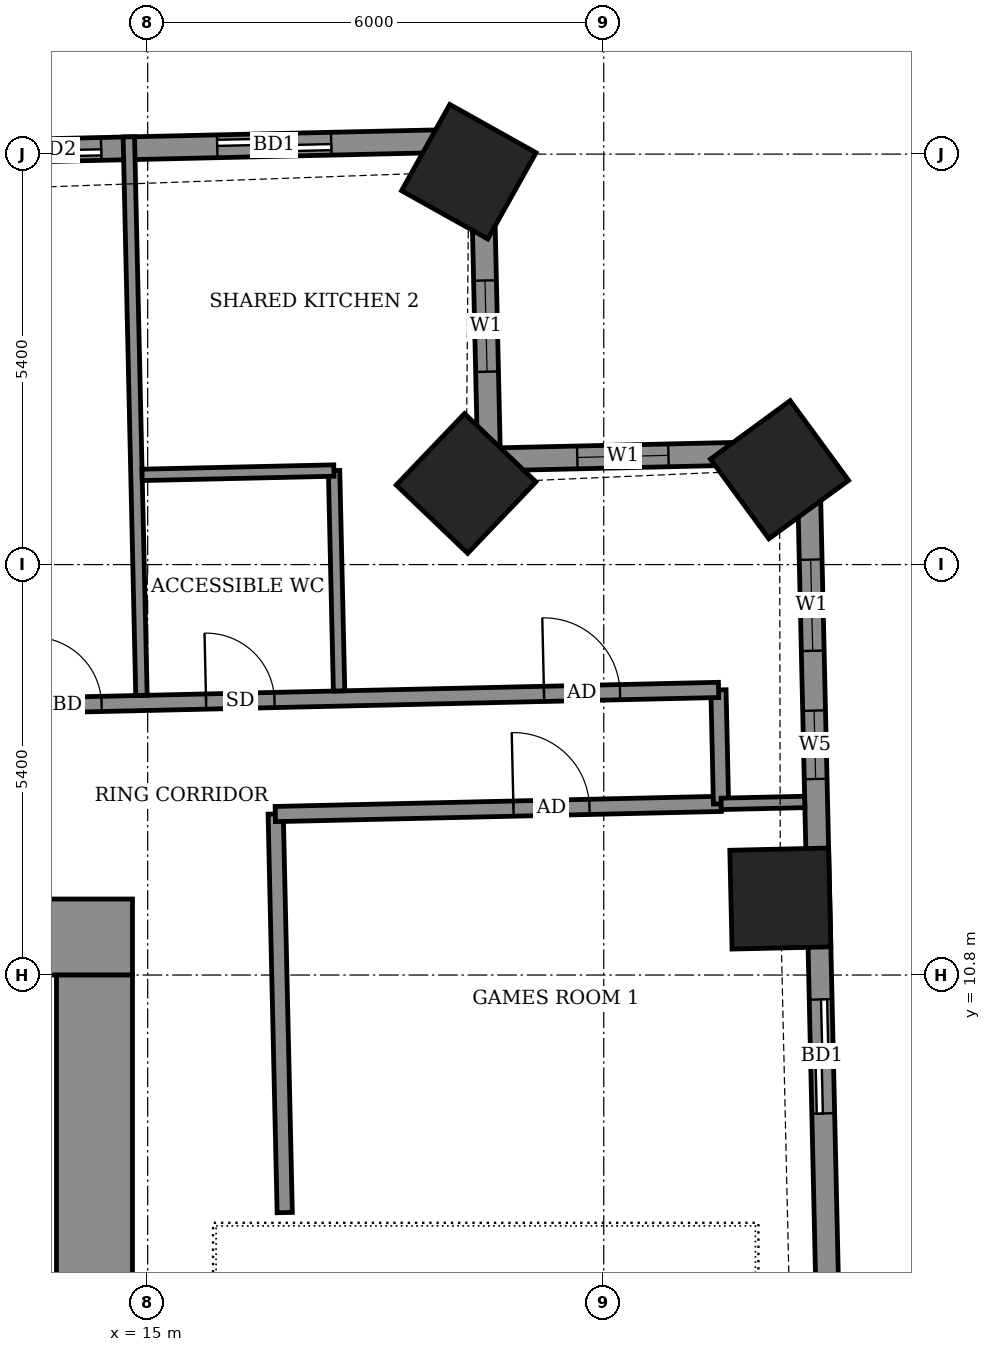
"""IFC4 building model, lengths in metres.
Left out: names, types, materials, properties, quantities, classifications, styles, units other than length and angle.
Written with IfcOpenShell. Run it as: python <this file> out.ifc"""

import sys

from ifc_helpers import new_model, si_unit, direction, frame, frame_2d, origin, origin_2d, place, context, subcontext, project, spatial, rectangle, extrude, element, fill, save


model = new_model("IFC4")
c1 = context("Model", 3, precision=1e-05, world=origin(), true_north=direction((0.0, 1.0)))
c2 = subcontext(c1, "Body", "Model", "MODEL_VIEW")
j1 = project(units=[si_unit("LENGTHUNIT", "METRE"), si_unit("PLANEANGLEUNIT", "RADIAN")], contexts=[c1])
p1 = place(None, origin())
s1 = spatial("IfcSite", under=j1, at=p1, CompositionType="ELEMENT")
p2 = place(p1, origin())
s2 = spatial("IfcBuilding", under=s1, at=p2, CompositionType="ELEMENT")
p3 = place(p2, frame((0.0, 0.0, 137.3)))
s3 = spatial("IfcBuildingStorey", under=s2, at=p3, CompositionType="ELEMENT", Elevation=137.3)
for number, where, z_axis, x_axis in (
    (1, (23.323, 11.806, -0.55), (0.0, 0.0, 1.0), (-0.023, 1.0, 0.0)),
    (2, (23.313, 17.448, -0.55), (0.0, 0.0, 1.0), (-0.591, 0.807, 0.0)),
    (3, (19.189, 17.267, -0.55), (0.0, 0.0, 1.0), (-0.723, 0.691, 0.0)),
    (4, (19.225, 21.369, -0.55), (0.0, 0.0, 1.0), (-0.873, 0.488, 0.0)),
):
    element("IfcColumn", number, at=place(p3, frame(where, z_axis=z_axis, x_axis=x_axis)), inside=s3, PredefinedType="COLUMN", context=c2, shape_type="SweptSolid", body=[
        extrude(rectangle(XDim=1.3, YDim=1.3, at=origin_2d()), origin(), (0.0, 0.0, 1.0), 3.6),
    ])
p4 = place(p3, frame((23.961, 5.752, 0.0), z_axis=(0.0, 0.0, 1.0), x_axis=(-0.022715362207, 0.999741972871, 0.0)))
e5 = element("IfcWall", 5, at=p4, inside=s3, PredefinedType="SOLIDWALL", context=c2, shape_type="SweptSolid", body=[
    extrude(rectangle(XDim=11.93, YDim=0.3, at=frame_2d((5.965, 0.0))), origin(), (0.0, 0.0, 1.0), 3.05),
])
p5 = place(p4, frame((3.228, 0.0, 0.0)))
e6 = element("IfcOpeningElement", 6, at=p5, cuts=e5, PredefinedType="OPENING", context=c2, shape_type="SweptSolid", body=[
    extrude(rectangle(XDim=1.5, YDim=2.4, at=frame_2d((0.75, 1.2))), frame((0.0, 0.16, 0.0), z_axis=(0.0, -1.0, 0.0), x_axis=(1.0, 0.0, 0.0)), (0.0, 0.0, 1.0), 0.32),
])
p6 = place(p4, frame((7.629, 0.0, 0.9)))
e7 = element("IfcOpeningElement", 7, at=p6, cuts=e5, PredefinedType="OPENING", context=c2, shape_type="SweptSolid", body=[
    extrude(rectangle(XDim=0.9, YDim=1.5, at=frame_2d((0.45, 0.75))), frame((0.0, 0.16, 0.0), z_axis=(0.0, -1.0, 0.0), x_axis=(1.0, 0.0, 0.0)), (0.0, 0.0, 1.0), 0.32),
])
p7 = place(p4, frame((9.316, 0.0, 0.9)))
e8 = element("IfcOpeningElement", 8, at=p7, cuts=e5, PredefinedType="OPENING", context=c2, shape_type="SweptSolid", body=[
    extrude(rectangle(XDim=1.2, YDim=1.5, at=frame_2d((0.6, 0.75))), frame((0.0, 0.16, 0.0), z_axis=(0.0, -1.0, 0.0), x_axis=(1.0, 0.0, 0.0)), (0.0, 0.0, 1.0), 0.32),
])
p8 = place(p3, frame((23.69, 17.679, 0.0), z_axis=(0.0, 0.0, 1.0), x_axis=(-0.999739037152, -0.022844202663, 0.0)))
e9 = element("IfcWall", 9, at=p8, inside=s3, PredefinedType="SOLIDWALL", context=c2, shape_type="SweptSolid", body=[
    extrude(rectangle(XDim=4.2, YDim=0.3, at=frame_2d((2.1, 0.0))), origin(), (0.0, 0.0, 1.0), 2.55),
])
p9 = place(p8, frame((1.839, 0.0, 0.9)))
e10 = element("IfcOpeningElement", 10, at=p9, cuts=e9, PredefinedType="OPENING", context=c2, shape_type="SweptSolid", body=[
    extrude(rectangle(XDim=1.2, YDim=1.5, at=frame_2d((0.6, 0.75))), frame((0.0, 0.16, 0.0), z_axis=(0.0, -1.0, 0.0), x_axis=(1.0, 0.0, 0.0)), (0.0, 0.0, 1.0), 0.32),
])
p10 = place(p3, frame((19.491, 17.583, 0.0), z_axis=(0.0, 0.0, 1.0), x_axis=(-0.022611811187, 0.999744320311, 0.0)))
e11 = element("IfcWall", 11, at=p10, inside=s3, PredefinedType="SOLIDWALL", context=c2, shape_type="SweptSolid", body=[
    extrude(rectangle(XDim=4.2, YDim=0.3, at=frame_2d((2.1, 0.0))), origin(), (0.0, 0.0, 1.0), 2.55),
])
p11 = place(p10, frame((1.155, 0.0, 0.9)))
e12 = element("IfcOpeningElement", 12, at=p11, cuts=e11, PredefinedType="OPENING", context=c2, shape_type="SweptSolid", body=[
    extrude(rectangle(XDim=1.2, YDim=1.5, at=frame_2d((0.6, 0.75))), frame((0.0, 0.16, 0.0), z_axis=(0.0, -1.0, 0.0), x_axis=(1.0, 0.0, 0.0)), (0.0, 0.0, 1.0), 0.32),
])
p12 = place(p3, frame((19.396, 21.782, 0.0), z_axis=(0.0, 0.0, 1.0), x_axis=(-0.999742636707, -0.022686126826, 0.0)))
e13 = element("IfcWall", 13, at=p12, inside=s3, PredefinedType="SOLIDWALL", context=c2, shape_type="SweptSolid", body=[
    extrude(rectangle(XDim=42.444, YDim=0.3, at=frame_2d((21.222, 0.0))), origin(), (0.0, 0.0, 1.0), 3.05),
])
p13 = place(p12, frame((1.982, 0.0, 0.0)))
e14 = element("IfcOpeningElement", 14, at=p13, cuts=e13, PredefinedType="OPENING", context=c2, shape_type="SweptSolid", body=[
    extrude(rectangle(XDim=1.5, YDim=2.4, at=frame_2d((0.75, 1.2))), frame((0.0, 0.16, 0.0), z_axis=(0.0, -1.0, 0.0), x_axis=(1.0, 0.0, 0.0)), (0.0, 0.0, 1.0), 0.32),
])
p14 = place(p12, frame((5.009, 0.0, 0.0)))
e15 = element("IfcOpeningElement", 15, at=p14, cuts=e13, PredefinedType="OPENING", context=c2, shape_type="SweptSolid", body=[
    extrude(rectangle(XDim=1.2, YDim=2.4, at=frame_2d((0.6, 1.2))), frame((0.0, 0.16, 0.0), z_axis=(0.0, -1.0, 0.0), x_axis=(1.0, 0.0, 0.0)), (0.0, 0.0, 1.0), 0.32),
])
p15 = place(p12, frame((10.394, 0.0, 0.0)))
e16 = element("IfcOpeningElement", 16, at=p15, cuts=e13, PredefinedType="OPENING", context=c2, shape_type="SweptSolid", body=[
    extrude(rectangle(XDim=1.5, YDim=2.4, at=frame_2d((0.75, 1.2))), frame((0.0, 0.16, 0.0), z_axis=(0.0, -1.0, 0.0), x_axis=(1.0, 0.0, 0.0)), (0.0, 0.0, 1.0), 0.32),
])
p16 = place(p12, frame((15.346, 0.0, 0.0)))
e17 = element("IfcOpeningElement", 17, at=p16, cuts=e13, PredefinedType="OPENING", context=c2, shape_type="SweptSolid", body=[
    extrude(rectangle(XDim=1.5, YDim=2.4, at=frame_2d((0.75, 1.2))), frame((0.0, 0.16, 0.0), z_axis=(0.0, -1.0, 0.0), x_axis=(1.0, 0.0, 0.0)), (0.0, 0.0, 1.0), 0.32),
])
p17 = place(p12, frame((18.508, 0.0, 0.0)))
e18 = element("IfcOpeningElement", 18, at=p17, cuts=e13, PredefinedType="OPENING", context=c2, shape_type="SweptSolid", body=[
    extrude(rectangle(XDim=1.5, YDim=2.4, at=frame_2d((0.75, 1.2))), frame((0.0, 0.16, 0.0), z_axis=(0.0, -1.0, 0.0), x_axis=(1.0, 0.0, 0.0)), (0.0, 0.0, 1.0), 0.32),
])
p18 = place(p12, frame((23.544, 0.0, 0.0)))
e19 = element("IfcOpeningElement", 19, at=p18, cuts=e13, PredefinedType="OPENING", context=c2, shape_type="SweptSolid", body=[
    extrude(rectangle(XDim=1.5, YDim=2.4, at=frame_2d((0.75, 1.2))), frame((0.0, 0.16, 0.0), z_axis=(0.0, -1.0, 0.0), x_axis=(1.0, 0.0, 0.0)), (0.0, 0.0, 1.0), 0.32),
])
p19 = place(p12, frame((29.195, 0.0, 0.0)))
e20 = element("IfcOpeningElement", 20, at=p19, cuts=e13, PredefinedType="OPENING", context=c2, shape_type="SweptSolid", body=[
    extrude(rectangle(XDim=1.5, YDim=2.4, at=frame_2d((0.75, 1.2))), frame((0.0, 0.16, 0.0), z_axis=(0.0, -1.0, 0.0), x_axis=(1.0, 0.0, 0.0)), (0.0, 0.0, 1.0), 0.32),
])
p20 = place(p12, frame((32.357, 0.0, 0.0)))
e21 = element("IfcOpeningElement", 21, at=p20, cuts=e13, PredefinedType="OPENING", context=c2, shape_type="SweptSolid", body=[
    extrude(rectangle(XDim=1.5, YDim=2.4, at=frame_2d((0.75, 1.2))), frame((0.0, 0.16, 0.0), z_axis=(0.0, -1.0, 0.0), x_axis=(1.0, 0.0, 0.0)), (0.0, 0.0, 1.0), 0.32),
])
p21 = place(p12, frame((37.524, 0.0, 0.9)))
e22 = element("IfcOpeningElement", 22, at=p21, cuts=e13, PredefinedType="OPENING", context=c2, shape_type="SweptSolid", body=[
    extrude(rectangle(XDim=2.4, YDim=1.5, at=frame_2d((1.2, 0.75))), frame((0.0, 0.16, 0.0), z_axis=(0.0, -1.0, 0.0), x_axis=(1.0, 0.0, 0.0)), (0.0, 0.0, 1.0), 0.32),
])
p22 = place(p3, frame((16.803, 7.675, 0.0), z_axis=(0.0, 0.0, 1.0), x_axis=(-0.022667483124, 0.999743059595, 0.0)))
e23 = element("IfcWall", 23, at=p22, inside=s3, PredefinedType="PARTITIONING", context=c2, shape_type="SweptSolid", body=[
    extrude(rectangle(XDim=5.245, YDim=0.2, at=frame_2d((2.623, 0.0))), origin(), (0.0, 0.0, 1.0), 3.05),
])
p23 = place(p3, frame((16.679, 12.918, 0.0), z_axis=(0.0, 0.0, 1.0), x_axis=(0.999739057042, 0.022843332181, 0.0)))
e24 = element("IfcWall", 24, at=p23, inside=s3, PredefinedType="PARTITIONING", context=c2, shape_type="SweptSolid", body=[
    extrude(rectangle(XDim=5.867, YDim=0.2, at=frame_2d((2.934, 0.0))), origin(), (0.0, 0.0, 1.0), 3.05),
])
p24 = place(p23, frame((3.134, 0.0, 0.0)))
e25 = element("IfcOpeningElement", 25, at=p24, cuts=e24, PredefinedType="OPENING", context=c2, shape_type="SweptSolid", body=[
    extrude(rectangle(XDim=1.0, YDim=2.1, at=frame_2d((0.5, 1.05))), frame((0.0, 0.11, 0.0), z_axis=(0.0, -1.0, 0.0), x_axis=(1.0, 0.0, 0.0)), (0.0, 0.0, 1.0), 0.22),
])
p25 = place(p3, frame((22.543, 13.052, 0.0), z_axis=(0.0, 0.0, 1.0), x_axis=(-0.022632637625, 0.99974384905, 0.0)))
e26 = element("IfcWall", 26, at=p25, inside=s3, PredefinedType="PARTITIONING", context=c2, shape_type="SweptSolid", body=[
    extrude(rectangle(XDim=1.5, YDim=0.2, at=frame_2d((0.75, 0.0))), origin(), (0.0, 0.0, 1.0), 3.05),
])
p26 = place(p3, frame((22.545, 13.052, 0.0), z_axis=(0.0, 0.0, 1.0), x_axis=(0.999743438074, 0.022650784248, 0.0)))
e27 = element("IfcWall", 27, at=p26, inside=s3, PredefinedType="PARTITIONING", context=c2, shape_type="SweptSolid", body=[
    extrude(rectangle(XDim=1.099, YDim=0.15, at=frame_2d((0.55, 0.0))), origin(), (0.0, 0.0, 1.0), 2.55),
])
p27 = place(p3, frame((-26.421, 13.441, 0.0), z_axis=(0.0, 0.0, 1.0), x_axis=(0.999742754064, 0.022680954485, 0.0)))
e28 = element("IfcWall", 28, at=p27, inside=s3, PredefinedType="PARTITIONING", context=c2, shape_type="SweptSolid", body=[
    extrude(rectangle(XDim=48.945, YDim=0.2, at=frame_2d((24.472, 0.0))), origin(), (0.0, 0.0, 1.0), 3.05),
])
p28 = place(p27, frame((46.647, 0.0, 0.0)))
e29 = element("IfcOpeningElement", 29, at=p28, cuts=e28, PredefinedType="OPENING", context=c2, shape_type="SweptSolid", body=[
    extrude(rectangle(XDim=1.0, YDim=2.1, at=frame_2d((0.5, 1.05))), frame((0.0, 0.11, 0.0), z_axis=(0.0, -1.0, 0.0), x_axis=(1.0, 0.0, 0.0)), (0.0, 0.0, 1.0), 0.22),
])
p29 = place(p27, frame((42.2, 0.0, 0.0)))
e30 = element("IfcOpeningElement", 30, at=p29, cuts=e28, PredefinedType="OPENING", context=c2, shape_type="SweptSolid", body=[
    extrude(rectangle(XDim=0.9, YDim=2.1, at=frame_2d((0.45, 1.05))), frame((0.0, 0.11, 0.0), z_axis=(0.0, -1.0, 0.0), x_axis=(1.0, 0.0, 0.0)), (0.0, 0.0, 1.0), 0.22),
])
p30 = place(p27, frame((39.925, 0.0, 0.0)))
e31 = element("IfcOpeningElement", 31, at=p30, cuts=e28, PredefinedType="OPENING", context=c2, shape_type="SweptSolid", body=[
    extrude(rectangle(XDim=0.9, YDim=2.1, at=frame_2d((0.45, 1.05))), frame((0.0, 0.11, 0.0), z_axis=(0.0, -1.0, 0.0), x_axis=(1.0, 0.0, 0.0)), (0.0, 0.0, 1.0), 0.22),
])
p31 = place(p27, frame((33.2, 0.0, 0.0)))
e32 = element("IfcOpeningElement", 32, at=p31, cuts=e28, PredefinedType="OPENING", context=c2, shape_type="SweptSolid", body=[
    extrude(rectangle(XDim=0.9, YDim=2.1, at=frame_2d((0.45, 1.05))), frame((0.0, 0.11, 0.0), z_axis=(0.0, -1.0, 0.0), x_axis=(1.0, 0.0, 0.0)), (0.0, 0.0, 1.0), 0.22),
])
p32 = place(p27, frame((31.25, 0.0, 0.0)))
e33 = element("IfcOpeningElement", 33, at=p32, cuts=e28, PredefinedType="OPENING", context=c2, shape_type="SweptSolid", body=[
    extrude(rectangle(XDim=0.9, YDim=2.1, at=frame_2d((0.45, 1.05))), frame((0.0, 0.11, 0.0), z_axis=(0.0, -1.0, 0.0), x_axis=(1.0, 0.0, 0.0)), (0.0, 0.0, 1.0), 0.22),
])
p33 = place(p27, frame((24.5, 0.0, 0.0)))
e34 = element("IfcOpeningElement", 34, at=p33, cuts=e28, PredefinedType="OPENING", context=c2, shape_type="SweptSolid", body=[
    extrude(rectangle(XDim=0.9, YDim=2.1, at=frame_2d((0.45, 1.05))), frame((0.0, 0.11, 0.0), z_axis=(0.0, -1.0, 0.0), x_axis=(1.0, 0.0, 0.0)), (0.0, 0.0, 1.0), 0.22),
])
p34 = place(p27, frame((22.45, 0.0, 0.0)))
e35 = element("IfcOpeningElement", 35, at=p34, cuts=e28, PredefinedType="OPENING", context=c2, shape_type="SweptSolid", body=[
    extrude(rectangle(XDim=0.9, YDim=2.1, at=frame_2d((0.45, 1.05))), frame((0.0, 0.11, 0.0), z_axis=(0.0, -1.0, 0.0), x_axis=(1.0, 0.0, 0.0)), (0.0, 0.0, 1.0), 0.22),
])
p35 = place(p27, frame((15.475, 0.0, 0.0)))
e36 = element("IfcOpeningElement", 36, at=p35, cuts=e28, PredefinedType="OPENING", context=c2, shape_type="SweptSolid", body=[
    extrude(rectangle(XDim=0.9, YDim=2.1, at=frame_2d((0.45, 1.05))), frame((0.0, 0.11, 0.0), z_axis=(0.0, -1.0, 0.0), x_axis=(1.0, 0.0, 0.0)), (0.0, 0.0, 1.0), 0.22),
])
p36 = place(p27, frame((13.4, 0.0, 0.0)))
e37 = element("IfcOpeningElement", 37, at=p36, cuts=e28, PredefinedType="OPENING", context=c2, shape_type="SweptSolid", body=[
    extrude(rectangle(XDim=0.9, YDim=2.1, at=frame_2d((0.45, 1.05))), frame((0.0, 0.11, 0.0), z_axis=(0.0, -1.0, 0.0), x_axis=(1.0, 0.0, 0.0)), (0.0, 0.0, 1.0), 0.22),
])
p37 = place(p27, frame((2.725, 0.0, 0.0)))
e38 = element("IfcOpeningElement", 38, at=p37, cuts=e28, PredefinedType="OPENING", context=c2, shape_type="SweptSolid", body=[
    extrude(rectangle(XDim=1.0, YDim=2.1, at=frame_2d((0.5, 1.05))), frame((0.0, 0.11, 0.0), z_axis=(0.0, -1.0, 0.0), x_axis=(1.0, 0.0, 0.0)), (0.0, 0.0, 1.0), 0.22),
])
p38 = place(p27, frame((8.7, 0.0, 0.0)))
e39 = element("IfcOpeningElement", 39, at=p38, cuts=e28, PredefinedType="OPENING", context=c2, shape_type="SweptSolid", body=[
    extrude(rectangle(XDim=0.9, YDim=2.1, at=frame_2d((0.45, 1.05))), frame((0.0, 0.11, 0.0), z_axis=(0.0, -1.0, 0.0), x_axis=(1.0, 0.0, 0.0)), (0.0, 0.0, 1.0), 0.22),
])
p39 = place(p3, frame((14.918, 14.479, 0.0), z_axis=(0.0, 0.0, 1.0), x_axis=(-0.022587849492, 0.99974486198, 0.0)))
e40 = element("IfcWall", 40, at=p39, inside=s3, PredefinedType="PARTITIONING", context=c2, shape_type="SweptSolid", body=[
    extrude(rectangle(XDim=7.35, YDim=0.15, at=frame_2d((3.675, 0.0))), origin(), (0.0, 0.0, 1.0), 2.55),
])
p40 = place(p3, frame((17.518, 14.538, 0.0), z_axis=(0.0, 0.0, 1.0), x_axis=(-0.022817032779, 0.999739657619, 0.0)))
e41 = element("IfcWall", 41, at=p40, inside=s3, PredefinedType="PARTITIONING", context=c2, shape_type="SweptSolid", body=[
    extrude(rectangle(XDim=2.9, YDim=0.15, at=frame_2d((1.45, 0.0))), origin(), (0.0, 0.0, 1.0), 3.05),
])
p41 = place(p3, frame((14.926, 17.38, 0.0), z_axis=(0.0, 0.0, 1.0), x_axis=(0.99974392816, 0.022629142889, 0.0)))
e42 = element("IfcWall", 42, at=p41, inside=s3, PredefinedType="PARTITIONING", context=c2, shape_type="SweptSolid", body=[
    extrude(rectangle(XDim=2.525, YDim=0.15, at=frame_2d((1.262, 0.0))), origin(), (0.0, 0.0, 1.0), 3.05),
])
p42 = place(p3, frame((-14.8, 11.3, 0.0), z_axis=(0.0, 0.0, 1.0), x_axis=(1.0, 0.0, 0.0)))
e43 = element("IfcWall", 43, at=p42, inside=s3, PredefinedType="SHEAR", context=c2, shape_type="SweptSolid", body=[
    extrude(rectangle(XDim=29.6, YDim=1.0, at=frame_2d((14.8, 0.0))), origin(), (0.0, 0.0, 1.0), 3.6),
])
p43 = place(p3, frame((14.3, -10.8, 0.0), z_axis=(0.0, 0.0, 1.0), x_axis=(0.0, 1.0, 0.0)))
e44 = element("IfcWall", 44, at=p43, inside=s3, PredefinedType="SHEAR", context=c2, shape_type="SweptSolid", body=[
    extrude(rectangle(XDim=21.6, YDim=1.0, at=frame_2d((10.8, 0.0))), origin(), (0.0, 0.0, 1.0), 3.6),
])
p44 = place(p43, frame((1.2, 0.0, 0.0)))
e45 = element("IfcOpeningElement", 45, at=p44, cuts=e44, PredefinedType="OPENING", context=c2, shape_type="SweptSolid", body=[
    extrude(rectangle(XDim=1.2, YDim=2.1, at=frame_2d((0.6, 1.05))), frame((0.0, 0.51, 0.0), z_axis=(0.0, -1.0, 0.0), x_axis=(1.0, 0.0, 0.0)), (0.0, 0.0, 1.0), 1.02),
])
p45 = place(p5, origin())
e46 = element("IfcDoor", 46, at=p45, inside=s3, OperationType="SLIDING_TO_LEFT", PredefinedType="DOOR", context=c2, shape_type="SweptSolid", body=[
    extrude(rectangle(XDim=1.5, YDim=2.4, at=frame_2d((0.75, 1.2))), frame((0.0, 0.025, 0.0), z_axis=(0.0, -1.0, 0.0), x_axis=(1.0, 0.0, 0.0)), (0.0, 0.0, 1.0), 0.05),
])
fill(e6, e46)
p46 = place(p6, origin())
e47 = element("IfcWindow", 47, at=p46, inside=s3, PartitioningType="SINGLE_PANEL", PredefinedType="WINDOW", context=c2, shape_type="SweptSolid", body=[
    extrude(rectangle(XDim=0.9, YDim=1.5, at=frame_2d((0.45, 0.75))), frame((0.0, 0.03, 0.0), z_axis=(0.0, -1.0, 0.0), x_axis=(1.0, 0.0, 0.0)), (0.0, 0.0, 1.0), 0.06),
])
fill(e7, e47)
p47 = place(p7, origin())
e48 = element("IfcWindow", 48, at=p47, inside=s3, PartitioningType="SINGLE_PANEL", PredefinedType="WINDOW", context=c2, shape_type="SweptSolid", body=[
    extrude(rectangle(XDim=1.2, YDim=1.5, at=frame_2d((0.6, 0.75))), frame((0.0, 0.03, 0.0), z_axis=(0.0, -1.0, 0.0), x_axis=(1.0, 0.0, 0.0)), (0.0, 0.0, 1.0), 0.06),
])
fill(e8, e48)
p48 = place(p9, origin())
e49 = element("IfcWindow", 49, at=p48, inside=s3, PartitioningType="SINGLE_PANEL", PredefinedType="WINDOW", context=c2, shape_type="SweptSolid", body=[
    extrude(rectangle(XDim=1.2, YDim=1.5, at=frame_2d((0.6, 0.75))), frame((0.0, 0.03, 0.0), z_axis=(0.0, -1.0, 0.0), x_axis=(1.0, 0.0, 0.0)), (0.0, 0.0, 1.0), 0.06),
])
fill(e10, e49)
p49 = place(p11, origin())
e50 = element("IfcWindow", 50, at=p49, inside=s3, PartitioningType="SINGLE_PANEL", PredefinedType="WINDOW", context=c2, shape_type="SweptSolid", body=[
    extrude(rectangle(XDim=1.2, YDim=1.5, at=frame_2d((0.6, 0.75))), frame((0.0, 0.03, 0.0), z_axis=(0.0, -1.0, 0.0), x_axis=(1.0, 0.0, 0.0)), (0.0, 0.0, 1.0), 0.06),
])
fill(e12, e50)
p50 = place(p13, origin())
e51 = element("IfcDoor", 51, at=p50, inside=s3, OperationType="SLIDING_TO_LEFT", PredefinedType="DOOR", context=c2, shape_type="SweptSolid", body=[
    extrude(rectangle(XDim=1.5, YDim=2.4, at=frame_2d((0.75, 1.2))), frame((0.0, 0.025, 0.0), z_axis=(0.0, -1.0, 0.0), x_axis=(1.0, 0.0, 0.0)), (0.0, 0.0, 1.0), 0.05),
])
fill(e14, e51)
p51 = place(p14, origin())
e52 = element("IfcDoor", 52, at=p51, inside=s3, OperationType="SLIDING_TO_LEFT", PredefinedType="DOOR", context=c2, shape_type="SweptSolid", body=[
    extrude(rectangle(XDim=1.2, YDim=2.4, at=frame_2d((0.6, 1.2))), frame((0.0, 0.025, 0.0), z_axis=(0.0, -1.0, 0.0), x_axis=(1.0, 0.0, 0.0)), (0.0, 0.0, 1.0), 0.05),
])
fill(e15, e52)
p52 = place(p24, origin())
e53 = element("IfcDoor", 53, at=p52, inside=s3, OperationType="SINGLE_SWING_LEFT", PredefinedType="DOOR", context=c2, shape_type="SweptSolid", body=[
    extrude(rectangle(XDim=1.0, YDim=2.1, at=frame_2d((0.5, 1.05))), frame((0.0, 0.025, 0.0), z_axis=(0.0, -1.0, 0.0), x_axis=(1.0, 0.0, 0.0)), (0.0, 0.0, 1.0), 0.05),
])
fill(e25, e53)
p53 = place(p28, origin())
e54 = element("IfcDoor", 54, at=p53, inside=s3, OperationType="SINGLE_SWING_RIGHT", PredefinedType="DOOR", context=c2, shape_type="SweptSolid", body=[
    extrude(rectangle(XDim=1.0, YDim=2.1, at=frame_2d((0.5, 1.05))), frame((0.0, 0.025, 0.0), z_axis=(0.0, -1.0, 0.0), x_axis=(1.0, 0.0, 0.0)), (0.0, 0.0, 1.0), 0.05),
])
fill(e29, e54)
p54 = place(p29, origin())
e55 = element("IfcDoor", 55, at=p54, inside=s3, OperationType="SINGLE_SWING_LEFT", PredefinedType="DOOR", context=c2, shape_type="SweptSolid", body=[
    extrude(rectangle(XDim=0.9, YDim=2.1, at=frame_2d((0.45, 1.05))), frame((0.0, 0.025, 0.0), z_axis=(0.0, -1.0, 0.0), x_axis=(1.0, 0.0, 0.0)), (0.0, 0.0, 1.0), 0.05),
])
fill(e30, e55)
p55 = place(p30, origin())
e56 = element("IfcDoor", 56, at=p55, inside=s3, OperationType="SINGLE_SWING_LEFT", PredefinedType="DOOR", context=c2, shape_type="SweptSolid", body=[
    extrude(rectangle(XDim=0.9, YDim=2.1, at=frame_2d((0.45, 1.05))), frame((0.0, 0.025, 0.0), z_axis=(0.0, -1.0, 0.0), x_axis=(1.0, 0.0, 0.0)), (0.0, 0.0, 1.0), 0.05),
])
fill(e31, e56)
save(model, sys.argv[1])
